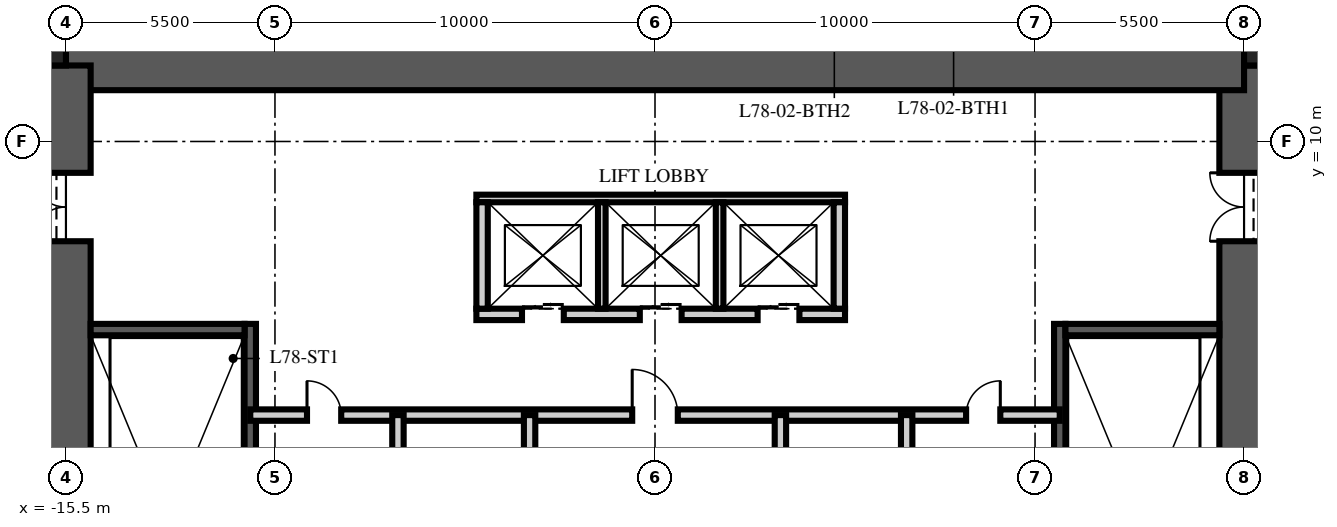
"""IFC4 building model, lengths in metres.
Left out: names, types, materials, properties, quantities, classifications, styles, units other than length and angle.
Written with IfcOpenShell. Run it as: python <this file> out.ifc"""

import sys

from ifc_helpers import new_model, si_unit, direction, frame, frame_2d, origin, origin_2d, place, context, subcontext, project, spatial, rectangle, extrude, element, fill, save


model = new_model("IFC4")
c1 = context("Model", 3, precision=1e-05, world=origin(), true_north=direction((0.0, 1.0)))
c2 = subcontext(c1, "Body", "Model", "MODEL_VIEW")
j1 = project(units=[si_unit("LENGTHUNIT", "METRE"), si_unit("PLANEANGLEUNIT", "RADIAN")], contexts=[c1])
p1 = place(None, origin())
s1 = spatial("IfcSite", under=j1, at=p1, CompositionType="ELEMENT")
p2 = place(p1, origin())
s2 = spatial("IfcBuilding", under=s1, at=p2, CompositionType="ELEMENT")
p3 = place(p2, frame((0.0, 0.0, 312.0)))
s3 = spatial("IfcBuildingStorey", under=s2, at=p3, CompositionType="ELEMENT", Elevation=312.0)
p4 = place(p3, frame((15.5, -12.0, -0.25), z_axis=(0.0, 0.0, 1.0), x_axis=(0.0, 1.0, 0.0)))
e1 = element("IfcWall", 1, at=p4, inside=s3, PredefinedType="SHEAR", context=c2, shape_type="SweptSolid", body=[
    extrude(rectangle(XDim=24.0, YDim=1.3, at=frame_2d((12.0, 0.0))), origin(), (0.0, 0.0, 1.0), 3.75),
])
p5 = place(p4, frame((3.125, 0.0, 0.25)))
e2 = element("IfcOpeningElement", 2, at=p5, cuts=e1, PredefinedType="OPENING", context=c2, shape_type="SweptSolid", body=[
    extrude(rectangle(XDim=1.2, YDim=2.1, at=frame_2d((0.6, 1.05))), frame((0.0, 0.66, 0.0), z_axis=(0.0, -1.0, 0.0), x_axis=(1.0, 0.0, 0.0)), (0.0, 0.0, 1.0), 1.32),
])
p6 = place(p4, frame((19.375, 0.0, 0.25)))
e3 = element("IfcOpeningElement", 3, at=p6, cuts=e1, PredefinedType="OPENING", context=c2, shape_type="SweptSolid", body=[
    extrude(rectangle(XDim=1.8, YDim=2.1, at=frame_2d((0.9, 1.05))), frame((0.0, 0.66, 0.0), z_axis=(0.0, -1.0, 0.0), x_axis=(1.0, 0.0, 0.0)), (0.0, 0.0, 1.0), 1.32),
])
p7 = place(p3, frame((-15.5, 12.0, -0.25), z_axis=(0.0, 0.0, 1.0), x_axis=(1.0, 0.0, 0.0)))
e4 = element("IfcWall", 4, at=p7, inside=s3, PredefinedType="SHEAR", context=c2, shape_type="SweptSolid", body=[
    extrude(rectangle(XDim=31.0, YDim=1.3, at=frame_2d((15.5, 0.0))), origin(), (0.0, 0.0, 1.0), 3.75),
])
p8 = place(p3, frame((-15.5, -12.0, -0.25), z_axis=(0.0, 0.0, 1.0), x_axis=(0.0, 1.0, 0.0)))
e5 = element("IfcWall", 5, at=p8, inside=s3, PredefinedType="SHEAR", context=c2, shape_type="SweptSolid", body=[
    extrude(rectangle(XDim=24.0, YDim=1.3, at=frame_2d((12.0, 0.0))), origin(), (0.0, 0.0, 1.0), 3.75),
])
p9 = place(p8, frame((3.125, 0.0, 0.25)))
e6 = element("IfcOpeningElement", 6, at=p9, cuts=e5, PredefinedType="OPENING", context=c2, shape_type="SweptSolid", body=[
    extrude(rectangle(XDim=1.2, YDim=2.1, at=frame_2d((0.6, 1.05))), frame((0.0, 0.66, 0.0), z_axis=(0.0, -1.0, 0.0), x_axis=(1.0, 0.0, 0.0)), (0.0, 0.0, 1.0), 1.32),
])
p10 = place(p8, frame((19.375, 0.0, 0.25)))
e7 = element("IfcOpeningElement", 7, at=p10, cuts=e5, PredefinedType="OPENING", context=c2, shape_type="SweptSolid", body=[
    extrude(rectangle(XDim=1.8, YDim=2.1, at=frame_2d((0.9, 1.05))), frame((0.0, 0.66, 0.0), z_axis=(0.0, -1.0, 0.0), x_axis=(1.0, 0.0, 0.0)), (0.0, 0.0, 1.0), 1.32),
])
for number, where, z_axis, x_axis in (
    (8, (15.825, 12.325, -0.25), (0.0, 0.0, 1.0), (1.0, 0.0, 0.0)),
    (9, (-15.825, 12.325, -0.25), (0.0, 0.0, 1.0), (1.0, 0.0, 0.0)),
):
    element("IfcColumn", number, at=place(p3, frame(where, z_axis=z_axis, x_axis=x_axis)), inside=s3, PredefinedType="COLUMN", context=c2, shape_type="SweptSolid", body=[
        extrude(rectangle(XDim=0.65, YDim=0.65, at=origin_2d()), origin(), (0.0, 0.0, 1.0), 3.75),
    ])
p11 = place(p3, frame((-10.65, -4.9, 0.0), z_axis=(0.0, 0.0, 1.0), x_axis=(0.0, 1.0, 0.0)))
e10 = element("IfcWall", 10, at=p11, inside=s3, PredefinedType="SOLIDWALL", context=c2, shape_type="SweptSolid", body=[
    extrude(rectangle(XDim=10.1, YDim=0.3, at=frame_2d((5.05, 0.0))), origin(), (0.0, 0.0, 1.0), 3.5),
])
p12 = place(p3, frame((-14.85, 5.05, 0.0), z_axis=(0.0, 0.0, 1.0), x_axis=(1.0, 0.0, 0.0)))
e11 = element("IfcWall", 11, at=p12, inside=s3, PredefinedType="SOLIDWALL", context=c2, shape_type="SweptSolid", body=[
    extrude(rectangle(XDim=4.05, YDim=0.3, at=frame_2d((2.025, 0.0))), origin(), (0.0, 0.0, 1.0), 3.5),
])
p13 = place(p3, frame((10.65, -4.9, 0.0), z_axis=(0.0, 0.0, 1.0), x_axis=(0.0, 1.0, 0.0)))
e12 = element("IfcWall", 12, at=p13, inside=s3, PredefinedType="SOLIDWALL", context=c2, shape_type="SweptSolid", body=[
    extrude(rectangle(XDim=10.1, YDim=0.3, at=frame_2d((5.05, 0.0))), origin(), (0.0, 0.0, 1.0), 3.5),
])
p14 = place(p3, frame((14.85, 5.05, 0.0), z_axis=(0.0, 0.0, 1.0), x_axis=(-1.0, 0.0, 0.0)))
e13 = element("IfcWall", 13, at=p14, inside=s3, PredefinedType="SOLIDWALL", context=c2, shape_type="SweptSolid", body=[
    extrude(rectangle(XDim=4.05, YDim=0.3, at=frame_2d((2.025, 0.0))), origin(), (0.0, 0.0, 1.0), 3.5),
])
p15 = place(p3, frame((-4.7, 5.45, 0.0), z_axis=(0.0, 0.0, 1.0), x_axis=(1.0, 0.0, 0.0)))
e14 = element("IfcWall", 14, at=p15, inside=s3, PredefinedType="PARTITIONING", context=c2, shape_type="SweptSolid", body=[
    extrude(rectangle(XDim=9.7, YDim=0.3, at=frame_2d((4.85, 0.0))), origin(), (0.0, 0.0, 1.0), 3.5),
])
p16 = place(p15, frame((1.2, 0.0, 0.0)))
e15 = element("IfcOpeningElement", 15, at=p16, cuts=e14, PredefinedType="OPENING", context=c2, shape_type="SweptSolid", body=[
    extrude(rectangle(XDim=1.1, YDim=2.1, at=frame_2d((0.55, 1.05))), frame((0.0, 0.16, 0.0), z_axis=(0.0, -1.0, 0.0), x_axis=(1.0, 0.0, 0.0)), (0.0, 0.0, 1.0), 0.32),
])
p17 = place(p15, frame((4.3, 0.0, 0.0)))
e16 = element("IfcOpeningElement", 16, at=p17, cuts=e14, PredefinedType="OPENING", context=c2, shape_type="SweptSolid", body=[
    extrude(rectangle(XDim=1.1, YDim=2.1, at=frame_2d((0.55, 1.05))), frame((0.0, 0.16, 0.0), z_axis=(0.0, -1.0, 0.0), x_axis=(1.0, 0.0, 0.0)), (0.0, 0.0, 1.0), 0.32),
])
p18 = place(p15, frame((7.4, 0.0, 0.0)))
e17 = element("IfcOpeningElement", 17, at=p18, cuts=e14, PredefinedType="OPENING", context=c2, shape_type="SweptSolid", body=[
    extrude(rectangle(XDim=1.1, YDim=2.1, at=frame_2d((0.55, 1.05))), frame((0.0, 0.16, 0.0), z_axis=(0.0, -1.0, 0.0), x_axis=(1.0, 0.0, 0.0)), (0.0, 0.0, 1.0), 0.32),
])
p19 = place(p3, frame((-4.7, 8.5, 0.0), z_axis=(0.0, 0.0, 1.0), x_axis=(1.0, 0.0, 0.0)))
e18 = element("IfcWall", 18, at=p19, inside=s3, PredefinedType="PARTITIONING", context=c2, shape_type="SweptSolid", body=[
    extrude(rectangle(XDim=9.7, YDim=0.2, at=frame_2d((4.85, 0.0))), origin(), (0.0, 0.0, 1.0), 3.5),
])
for number, where, z_axis, x_axis in (
    (19, (-4.55, 5.6, 0.0), (0.0, 0.0, 1.0), (0.0, 1.0, 0.0)),
    (20, (4.85, 5.6, 0.0), (0.0, 0.0, 1.0), (0.0, 1.0, 0.0)),
):
    element("IfcWall", number, at=place(p3, frame(where, z_axis=z_axis, x_axis=x_axis)), inside=s3, PredefinedType="PARTITIONING", context=c2, shape_type="SweptSolid", body=[
        extrude(rectangle(XDim=2.8, YDim=0.3, at=frame_2d((1.4, 0.0))), origin(), (0.0, 0.0, 1.0), 3.5),
    ])
for number, where, z_axis, x_axis in (
    (21, (-1.4, 5.6, 0.0), (0.0, 0.0, 1.0), (0.0, 1.0, 0.0)),
    (22, (1.7, 5.6, 0.0), (0.0, 0.0, 1.0), (0.0, 1.0, 0.0)),
):
    element("IfcWall", number, at=place(p3, frame(where, z_axis=z_axis, x_axis=x_axis)), inside=s3, PredefinedType="PARTITIONING", context=c2, shape_type="SweptSolid", body=[
        extrude(rectangle(XDim=2.8, YDim=0.2, at=frame_2d((1.4, 0.0))), origin(), (0.0, 0.0, 1.0), 3.5),
    ])
p20 = place(p3, frame((-10.65, 2.8, 0.0), z_axis=(0.0, 0.0, 1.0), x_axis=(1.0, 0.0, 0.0)))
e23 = element("IfcWall", 23, at=p20, inside=s3, PredefinedType="PARTITIONING", context=c2, shape_type="SweptSolid", body=[
    extrude(rectangle(XDim=21.3, YDim=0.3, at=frame_2d((10.65, 0.0))), origin(), (0.0, 0.0, 1.0), 3.5),
])
p21 = place(p20, frame((10.05, 0.0, 0.0)))
e24 = element("IfcOpeningElement", 24, at=p21, cuts=e23, PredefinedType="OPENING", context=c2, shape_type="SweptSolid", body=[
    extrude(rectangle(XDim=1.2, YDim=2.1, at=frame_2d((0.6, 1.05))), frame((0.0, 0.16, 0.0), z_axis=(0.0, -1.0, 0.0), x_axis=(1.0, 0.0, 0.0)), (0.0, 0.0, 1.0), 0.32),
])
p22 = place(p20, frame((1.493, 0.0, 0.0)))
e25 = element("IfcOpeningElement", 25, at=p22, cuts=e23, PredefinedType="OPENING", context=c2, shape_type="SweptSolid", body=[
    extrude(rectangle(XDim=0.9, YDim=2.1, at=frame_2d((0.45, 1.05))), frame((0.0, 0.16, 0.0), z_axis=(0.0, -1.0, 0.0), x_axis=(1.0, 0.0, 0.0)), (0.0, 0.0, 1.0), 0.32),
])
p23 = place(p20, frame((18.836, 0.0, 0.0)))
e26 = element("IfcOpeningElement", 26, at=p23, cuts=e23, PredefinedType="OPENING", context=c2, shape_type="SweptSolid", body=[
    extrude(rectangle(XDim=0.9, YDim=2.1, at=frame_2d((0.45, 1.05))), frame((0.0, 0.16, 0.0), z_axis=(0.0, -1.0, 0.0), x_axis=(1.0, 0.0, 0.0)), (0.0, 0.0, 1.0), 0.32),
])
p24 = place(p3, frame((-3.3, -6.65, 0.0), z_axis=(0.0, 0.0, 1.0), x_axis=(0.0, 1.0, 0.0)))
e27 = element("IfcWall", 27, at=p24, inside=s3, PredefinedType="PARTITIONING", context=c2, shape_type="SweptSolid", body=[
    extrude(rectangle(XDim=9.45, YDim=0.3, at=frame_2d((4.725, 0.0))), origin(), (0.0, 0.0, 1.0), 3.5),
])
p25 = place(p24, frame((4.275, 0.0, 0.0)))
e28 = element("IfcOpeningElement", 28, at=p25, cuts=e27, PredefinedType="OPENING", context=c2, shape_type="SweptSolid", body=[
    extrude(rectangle(XDim=0.9, YDim=2.1, at=frame_2d((0.45, 1.05))), frame((0.0, 0.16, 0.0), z_axis=(0.0, -1.0, 0.0), x_axis=(1.0, 0.0, 0.0)), (0.0, 0.0, 1.0), 0.32),
])
p26 = place(p3, frame((3.3, -6.65, 0.0), z_axis=(0.0, 0.0, 1.0), x_axis=(0.0, 1.0, 0.0)))
e29 = element("IfcWall", 29, at=p26, inside=s3, PredefinedType="PARTITIONING", context=c2, shape_type="SweptSolid", body=[
    extrude(rectangle(XDim=9.45, YDim=0.3, at=frame_2d((4.725, 0.0))), origin(), (0.0, 0.0, 1.0), 3.5),
])
p27 = place(p26, frame((4.275, 0.0, 0.0)))
e30 = element("IfcOpeningElement", 30, at=p27, cuts=e29, PredefinedType="OPENING", context=c2, shape_type="SweptSolid", body=[
    extrude(rectangle(XDim=0.9, YDim=2.1, at=frame_2d((0.45, 1.05))), frame((0.0, 0.16, 0.0), z_axis=(0.0, -1.0, 0.0), x_axis=(1.0, 0.0, 0.0)), (0.0, 0.0, 1.0), 0.32),
])
for number, where, z_axis, x_axis in (
    (31, (-6.764, -6.65, 0.0), (0.0, 0.0, 1.0), (0.0, 1.0, 0.0)),
    (32, (6.622, -6.65, 0.0), (0.0, 0.0, 1.0), (0.0, 1.0, 0.0)),
):
    element("IfcWall", number, at=place(p3, frame(where, z_axis=z_axis, x_axis=x_axis)), inside=s3, PredefinedType="PARTITIONING", context=c2, shape_type="SweptSolid", body=[
        extrude(rectangle(XDim=9.45, YDim=0.3, at=frame_2d((4.725, 0.0))), origin(), (0.0, 0.0, 1.0), 3.5),
    ])
p28 = place(p10, origin())
e33 = element("IfcDoor", 33, at=p28, inside=s3, OperationType="DOUBLE_DOOR_SINGLE_SWING", PredefinedType="DOOR", context=c2, shape_type="SweptSolid", body=[
    extrude(rectangle(XDim=1.8, YDim=2.1, at=frame_2d((0.9, 1.05))), frame((0.0, 0.025, 0.0), z_axis=(0.0, -1.0, 0.0), x_axis=(1.0, 0.0, 0.0)), (0.0, 0.0, 1.0), 0.05),
])
fill(e7, e33)
p29 = place(p6, origin())
e34 = element("IfcDoor", 34, at=p29, inside=s3, OperationType="DOUBLE_DOOR_SINGLE_SWING", PredefinedType="DOOR", context=c2, shape_type="SweptSolid", body=[
    extrude(rectangle(XDim=1.8, YDim=2.1, at=frame_2d((0.9, 1.05))), frame((0.0, 0.025, 0.0), z_axis=(0.0, -1.0, 0.0), x_axis=(1.0, 0.0, 0.0)), (0.0, 0.0, 1.0), 0.05),
])
fill(e3, e34)
p30 = place(p16, origin())
e35 = element("IfcDoor", 35, at=p30, inside=s3, OperationType="DOUBLE_DOOR_SLIDING", PredefinedType="DOOR", context=c2, shape_type="SweptSolid", body=[
    extrude(rectangle(XDim=1.1, YDim=2.1, at=frame_2d((0.55, 1.05))), frame((0.0, 0.025, 0.0), z_axis=(0.0, -1.0, 0.0), x_axis=(1.0, 0.0, 0.0)), (0.0, 0.0, 1.0), 0.05),
])
fill(e15, e35)
p31 = place(p17, origin())
e36 = element("IfcDoor", 36, at=p31, inside=s3, OperationType="DOUBLE_DOOR_SLIDING", PredefinedType="DOOR", context=c2, shape_type="SweptSolid", body=[
    extrude(rectangle(XDim=1.1, YDim=2.1, at=frame_2d((0.55, 1.05))), frame((0.0, 0.025, 0.0), z_axis=(0.0, -1.0, 0.0), x_axis=(1.0, 0.0, 0.0)), (0.0, 0.0, 1.0), 0.05),
])
fill(e16, e36)
p32 = place(p18, origin())
e37 = element("IfcDoor", 37, at=p32, inside=s3, OperationType="DOUBLE_DOOR_SLIDING", PredefinedType="DOOR", context=c2, shape_type="SweptSolid", body=[
    extrude(rectangle(XDim=1.1, YDim=2.1, at=frame_2d((0.55, 1.05))), frame((0.0, 0.025, 0.0), z_axis=(0.0, -1.0, 0.0), x_axis=(1.0, 0.0, 0.0)), (0.0, 0.0, 1.0), 0.05),
])
fill(e17, e37)
p33 = place(p21, origin())
e38 = element("IfcDoor", 38, at=p33, inside=s3, OperationType="SINGLE_SWING_LEFT", PredefinedType="DOOR", context=c2, shape_type="SweptSolid", body=[
    extrude(rectangle(XDim=1.2, YDim=2.1, at=frame_2d((0.6, 1.05))), frame((0.0, 0.025, 0.0), z_axis=(0.0, -1.0, 0.0), x_axis=(1.0, 0.0, 0.0)), (0.0, 0.0, 1.0), 0.05),
])
fill(e24, e38)
p34 = place(p22, origin())
e39 = element("IfcDoor", 39, at=p34, inside=s3, OperationType="SINGLE_SWING_LEFT", PredefinedType="DOOR", context=c2, shape_type="SweptSolid", body=[
    extrude(rectangle(XDim=0.9, YDim=2.1, at=frame_2d((0.45, 1.05))), frame((0.0, 0.025, 0.0), z_axis=(0.0, -1.0, 0.0), x_axis=(1.0, 0.0, 0.0)), (0.0, 0.0, 1.0), 0.05),
])
fill(e25, e39)
p35 = place(p23, origin())
e40 = element("IfcDoor", 40, at=p35, inside=s3, OperationType="SINGLE_SWING_RIGHT", PredefinedType="DOOR", context=c2, shape_type="SweptSolid", body=[
    extrude(rectangle(XDim=0.9, YDim=2.1, at=frame_2d((0.45, 1.05))), frame((0.0, 0.025, 0.0), z_axis=(0.0, -1.0, 0.0), x_axis=(1.0, 0.0, 0.0)), (0.0, 0.0, 1.0), 0.05),
])
fill(e26, e40)
save(model, sys.argv[1])
